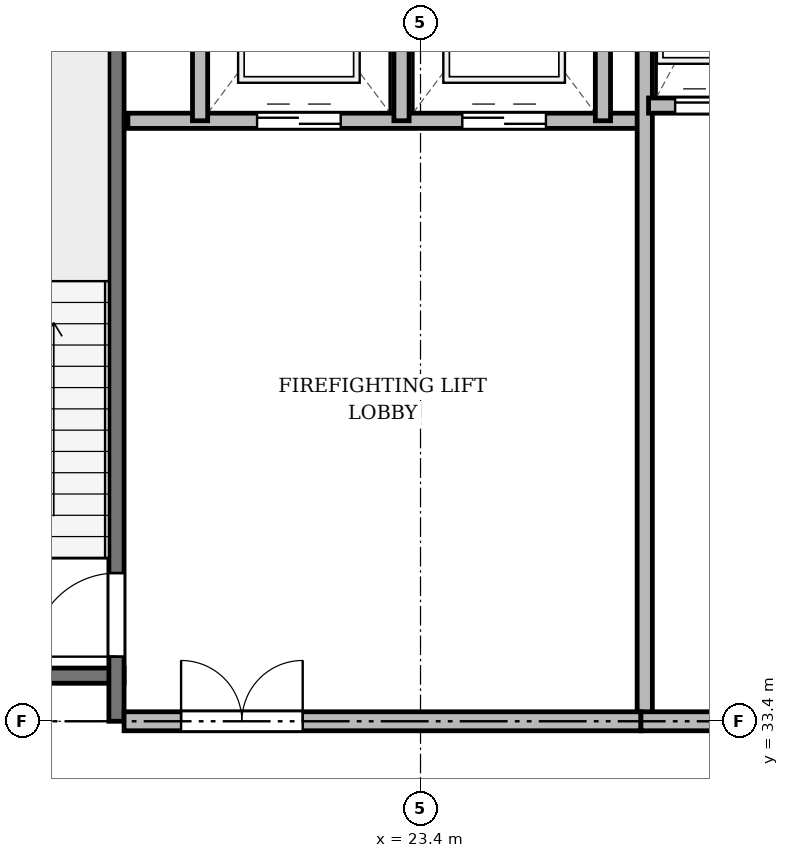
"""IFC4 building model, lengths in metres.
Left out: names, types, materials, properties, quantities, classifications, styles, units other than length and angle.
Written with IfcOpenShell. Run it as: python <this file> out.ifc"""

import sys

from ifc_helpers import new_model, si_unit, direction, frame, frame_2d, origin, place, context, subcontext, project, spatial, rectangle, extrude, source, transform, mapped, element, fill, save


model = new_model("IFC4")
c1 = context("Model", 3, precision=1e-05, world=origin(), true_north=direction((0.0, 1.0)))
c2 = subcontext(c1, "Body", "Model", "MODEL_VIEW")
j1 = project(units=[si_unit("LENGTHUNIT", "METRE"), si_unit("PLANEANGLEUNIT", "RADIAN")], contexts=[c1])
p1 = place(None, origin())
s1 = spatial("IfcSite", under=j1, at=p1, CompositionType="ELEMENT")
p2 = place(p1, origin())
s2 = spatial("IfcBuilding", under=s1, at=p2, CompositionType="ELEMENT")
p3 = place(p2, frame((0.0, 0.0, 18.7)))
s3 = spatial("IfcBuildingStorey", under=s2, at=p3, CompositionType="ELEMENT", Elevation=18.7)
p4 = place(p3, frame((16.1, 34.0, 0.0), z_axis=(0.0, 0.0, 1.0), x_axis=(1.0, 0.0, 0.0)))
e1 = element("IfcWall", 1, at=p4, inside=s3, PredefinedType="SHEAR", context=c2, shape_type="SweptSolid", body=[
    extrude(rectangle(XDim=3.4, YDim=0.2, at=frame_2d((1.7, 0.0))), origin(), (0.0, 0.0, 1.0), 4.42),
])
p5 = place(p3, frame((19.4, 33.4, 0.0), z_axis=(0.0, 0.0, 1.0), x_axis=(0.0, 1.0, 0.0)))
e2 = element("IfcWall", 2, at=p5, inside=s3, PredefinedType="SHEAR", context=c2, shape_type="SweptSolid", body=[
    extrude(rectangle(XDim=11.1, YDim=0.2, at=frame_2d((5.55, 0.0))), origin(), (0.0, 0.0, 1.0), 4.42),
])
p6 = place(p5, frame((0.85, 0.0, 0.0)))
e3 = element("IfcOpeningElement", 3, at=p6, cuts=e2, PredefinedType="OPENING", context=c2, shape_type="SweptSolid", body=[
    extrude(rectangle(XDim=1.1, YDim=2.15, at=frame_2d((0.55, 1.075))), frame((0.0, 0.11, 0.0), z_axis=(0.0, -1.0, 0.0), x_axis=(1.0, 0.0, 0.0)), (0.0, 0.0, 1.0), 0.22),
])
p7 = place(p3, frame((19.55, 41.3, 0.0), z_axis=(0.0, 0.0, 1.0), x_axis=(1.0, 0.0, 0.0)))
e4 = element("IfcWall", 4, at=p7, inside=s3, PredefinedType="SOLIDWALL", context=c2, shape_type="SweptSolid", body=[
    extrude(rectangle(XDim=6.75, YDim=0.2, at=frame_2d((3.375, 0.0))), origin(), (0.0, 0.0, 1.0), 4.42),
])
p8 = place(p7, frame((1.7, 0.0, 0.0)))
e5 = element("IfcOpeningElement", 5, at=p8, cuts=e4, PredefinedType="OPENING", context=c2, shape_type="SweptSolid", body=[
    extrude(rectangle(XDim=1.1, YDim=2.15, at=frame_2d((0.55, 1.075))), frame((0.0, 0.11, 0.0), z_axis=(0.0, -1.0, 0.0), x_axis=(1.0, 0.0, 0.0)), (0.0, 0.0, 1.0), 0.22),
])
p9 = place(p7, frame((4.4, 0.0, 0.0)))
e6 = element("IfcOpeningElement", 6, at=p9, cuts=e4, PredefinedType="OPENING", context=c2, shape_type="SweptSolid", body=[
    extrude(rectangle(XDim=1.1, YDim=2.15, at=frame_2d((0.55, 1.075))), frame((0.0, 0.11, 0.0), z_axis=(0.0, -1.0, 0.0), x_axis=(1.0, 0.0, 0.0)), (0.0, 0.0, 1.0), 0.22),
])
for number, where, z_axis, x_axis in (
    (7, (20.5, 41.3, 0.0), (0.0, 0.0, 1.0), (0.0, 1.0, 0.0)),
    (8, (23.15, 41.3, 0.0), (0.0, 0.0, 1.0), (0.0, 1.0, 0.0)),
    (9, (25.8, 41.3, 0.0), (0.0, 0.0, 1.0), (0.0, 1.0, 0.0)),
):
    element("IfcWall", number, at=place(p3, frame(where, z_axis=z_axis, x_axis=x_axis)), inside=s3, PredefinedType="SOLIDWALL", context=c2, shape_type="SweptSolid", body=[
        extrude(rectangle(XDim=3.4, YDim=0.2, at=frame_2d((1.7, 0.0))), origin(), (0.0, 0.0, 1.0), 4.42),
    ])
p10 = place(p3, frame((26.35, 33.4, 0.0), z_axis=(0.0, 0.0, 1.0), x_axis=(0.0, 1.0, 0.0)))
e10 = element("IfcWall", 10, at=p10, inside=s3, PredefinedType="SOLIDWALL", context=c2, shape_type="SweptSolid", body=[
    extrude(rectangle(XDim=11.3, YDim=0.2, at=frame_2d((5.65, 0.0))), origin(), (0.0, 0.0, 1.0), 2.62),
])
p11 = place(p3, frame((19.5, 33.4, 0.0), z_axis=(0.0, 0.0, 1.0), x_axis=(1.0, 0.0, 0.0)))
e11 = element("IfcWall", 11, at=p11, inside=s3, PredefinedType="PARTITIONING", context=c2, shape_type="SweptSolid", body=[
    extrude(rectangle(XDim=6.8, YDim=0.25, at=frame_2d((3.4, 0.0))), origin(), (0.0, 0.0, 1.0), 2.62),
])
p12 = place(p11, frame((0.75, 0.0, 0.0)))
e12 = element("IfcOpeningElement", 12, at=p12, cuts=e11, PredefinedType="OPENING", context=c2, shape_type="SweptSolid", body=[
    extrude(rectangle(XDim=1.6, YDim=2.2, at=frame_2d((0.8, 1.1))), frame((0.0, 0.135, 0.0), z_axis=(0.0, -1.0, 0.0), x_axis=(1.0, 0.0, 0.0)), (0.0, 0.0, 1.0), 0.27),
])
p13 = place(p3, frame((26.4, 41.5, 0.0), z_axis=(0.0, 0.0, 1.0), x_axis=(1.0, 0.0, 0.0)))
e13 = element("IfcWall", 13, at=p13, inside=s3, PredefinedType="SOLIDWALL", context=c2, shape_type="SweptSolid", body=[
    extrude(rectangle(XDim=6.95, YDim=0.2, at=frame_2d((3.475, 0.0))), origin(), (0.0, 0.0, 1.0), 4.42),
])
p14 = place(p13, frame((0.35, 0.0, 0.0)))
e14 = element("IfcOpeningElement", 14, at=p14, cuts=e13, PredefinedType="OPENING", context=c2, shape_type="SweptSolid", body=[
    extrude(rectangle(XDim=1.05, YDim=2.15, at=frame_2d((0.525, 1.075))), frame((0.0, 0.11, 0.0), z_axis=(0.0, -1.0, 0.0), x_axis=(1.0, 0.0, 0.0)), (0.0, 0.0, 1.0), 0.22),
])
p15 = place(p13, frame((2.05, 0.0, 0.0)))
e15 = element("IfcOpeningElement", 15, at=p15, cuts=e13, PredefinedType="OPENING", context=c2, shape_type="SweptSolid", body=[
    extrude(rectangle(XDim=1.05, YDim=2.15, at=frame_2d((0.525, 1.075))), frame((0.0, 0.11, 0.0), z_axis=(0.0, -1.0, 0.0), x_axis=(1.0, 0.0, 0.0)), (0.0, 0.0, 1.0), 0.22),
])
p16 = place(p13, frame((3.75, 0.0, 0.0)))
e16 = element("IfcOpeningElement", 16, at=p16, cuts=e13, PredefinedType="OPENING", context=c2, shape_type="SweptSolid", body=[
    extrude(rectangle(XDim=1.05, YDim=2.15, at=frame_2d((0.525, 1.075))), frame((0.0, 0.11, 0.0), z_axis=(0.0, -1.0, 0.0), x_axis=(1.0, 0.0, 0.0)), (0.0, 0.0, 1.0), 0.22),
])
p17 = place(p13, frame((5.45, 0.0, 0.0)))
e17 = element("IfcOpeningElement", 17, at=p17, cuts=e13, PredefinedType="OPENING", context=c2, shape_type="SweptSolid", body=[
    extrude(rectangle(XDim=1.05, YDim=2.15, at=frame_2d((0.525, 1.075))), frame((0.0, 0.11, 0.0), z_axis=(0.0, -1.0, 0.0), x_axis=(1.0, 0.0, 0.0)), (0.0, 0.0, 1.0), 0.22),
])
p18 = place(p3, frame((26.3, 33.4, 0.0), z_axis=(0.0, 0.0, 1.0), x_axis=(1.0, 0.0, 0.0)))
e18 = element("IfcWall", 18, at=p18, inside=s3, PredefinedType="PARTITIONING", context=c2, shape_type="SweptSolid", body=[
    extrude(rectangle(XDim=20.85, YDim=0.25, at=frame_2d((10.425, 0.0))), origin(), (0.0, 0.0, 1.0), 2.62),
])
p19 = place(p18, frame((9.2, 0.0, 0.0)))
e19 = element("IfcOpeningElement", 19, at=p19, cuts=e18, PredefinedType="OPENING", context=c2, shape_type="SweptSolid", body=[
    extrude(rectangle(XDim=1.6, YDim=2.2, at=frame_2d((0.8, 1.1))), frame((0.0, 0.135, 0.0), z_axis=(0.0, -1.0, 0.0), x_axis=(1.0, 0.0, 0.0)), (0.0, 0.0, 1.0), 0.27),
])
m1 = source(origin(), c2, "Body", "SweptSolid", [
    extrude(rectangle(XDim=1.1, YDim=2.15, at=frame_2d((0.55, 1.075))), frame((0.0, 0.025, 0.0), z_axis=(0.0, -1.0, 0.0), x_axis=(1.0, 0.0, 0.0)), (0.0, 0.0, 1.0), 0.05),
])
p20 = place(p6, origin())
e20 = element("IfcDoor", 20, at=p20, inside=s3, OperationType="SINGLE_SWING_LEFT", PredefinedType="DOOR", context=c2, shape_type="MappedRepresentation", body=[
    mapped(m1, transform((0.0, 0.0, 0.0), x_axis=(1.0, 0.0, 0.0), y_axis=(0.0, 1.0, 0.0), z_axis=(0.0, 0.0, 1.0), scale=1.0)),
])
fill(e3, e20)
p21 = place(p8, origin())
e21 = element("IfcDoor", 21, at=p21, inside=s3, OperationType="DOUBLE_DOOR_SLIDING", PredefinedType="DOOR", context=c2, shape_type="MappedRepresentation", body=[
    mapped(m1, transform((0.0, 0.0, 0.0), x_axis=(1.0, 0.0, 0.0), y_axis=(0.0, 1.0, 0.0), z_axis=(0.0, 0.0, 1.0), scale=1.0)),
])
fill(e5, e21)
p22 = place(p9, origin())
e22 = element("IfcDoor", 22, at=p22, inside=s3, OperationType="DOUBLE_DOOR_SLIDING", PredefinedType="DOOR", context=c2, shape_type="MappedRepresentation", body=[
    mapped(m1, transform((0.0, 0.0, 0.0), x_axis=(1.0, 0.0, 0.0), y_axis=(0.0, 1.0, 0.0), z_axis=(0.0, 0.0, 1.0), scale=1.0)),
])
fill(e6, e22)
m2 = source(origin(), c2, "Body", "SweptSolid", [
    extrude(rectangle(XDim=1.6, YDim=2.2, at=frame_2d((0.8, 1.1))), frame((0.0, 0.025, 0.0), z_axis=(0.0, -1.0, 0.0), x_axis=(1.0, 0.0, 0.0)), (0.0, 0.0, 1.0), 0.05),
])
p23 = place(p12, origin())
e23 = element("IfcDoor", 23, at=p23, inside=s3, OperationType="DOUBLE_DOOR_SINGLE_SWING", PredefinedType="DOOR", context=c2, shape_type="MappedRepresentation", body=[
    mapped(m2, transform((0.0, 0.0, 0.0), x_axis=(1.0, 0.0, 0.0), y_axis=(0.0, 1.0, 0.0), z_axis=(0.0, 0.0, 1.0), scale=1.0)),
])
fill(e12, e23)
m3 = source(origin(), c2, "Body", "SweptSolid", [
    extrude(rectangle(XDim=1.05, YDim=2.15, at=frame_2d((0.525, 1.075))), frame((0.0, 0.025, 0.0), z_axis=(0.0, -1.0, 0.0), x_axis=(1.0, 0.0, 0.0)), (0.0, 0.0, 1.0), 0.05),
])
p24 = place(p14, origin())
e24 = element("IfcDoor", 24, at=p24, inside=s3, OperationType="DOUBLE_DOOR_SLIDING", PredefinedType="DOOR", context=c2, shape_type="MappedRepresentation", body=[
    mapped(m3, transform((0.0, 0.0, 0.0), x_axis=(1.0, 0.0, 0.0), y_axis=(0.0, 1.0, 0.0), z_axis=(0.0, 0.0, 1.0), scale=1.0)),
])
fill(e14, e24)
save(model, sys.argv[1])
